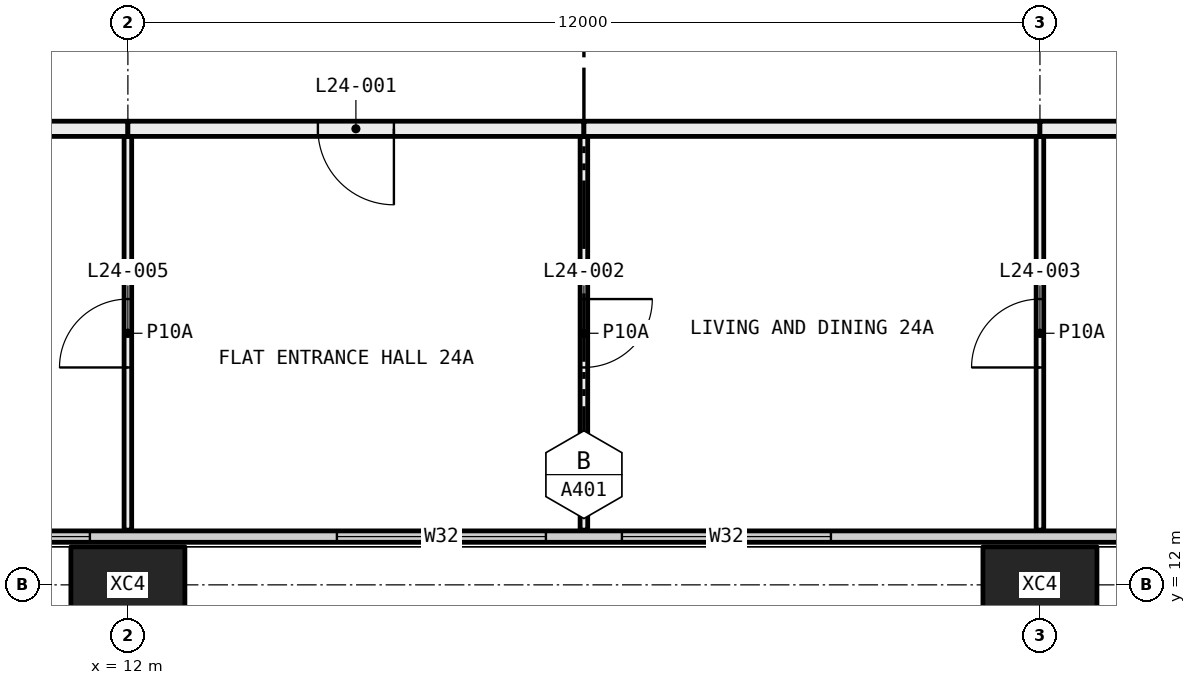
"""IFC4 building model, lengths in metres.
Left out: names, types, materials, properties, quantities, classifications, styles, units other than length and angle.
Written with IfcOpenShell. Run it as: python <this file> out.ifc"""

import sys

from ifc_helpers import new_model, si_unit, direction, frame, frame_2d, origin, origin_2d, place, context, subcontext, project, spatial, rectangle, hollow_rectangle, extrude, element, fill, save


model = new_model("IFC4")
c1 = context("Model", 3, precision=1e-05, world=origin(), true_north=direction((0.0, 1.0)))
c2 = subcontext(c1, "Body", "Model", "MODEL_VIEW")
j1 = project(units=[si_unit("LENGTHUNIT", "METRE"), si_unit("PLANEANGLEUNIT", "RADIAN")], contexts=[c1])
p1 = place(None, origin())
s1 = spatial("IfcSite", under=j1, at=p1, CompositionType="ELEMENT")
p2 = place(p1, origin())
s2 = spatial("IfcBuilding", under=s1, at=p2, CompositionType="ELEMENT")
p3 = place(p2, frame((0.0, 0.0, 96.6)))
s3 = spatial("IfcBuildingStorey", under=s2, at=p3, CompositionType="ELEMENT", Elevation=96.6)
for number, where, z_axis, x_axis in (
    (1, (12.0, 12.0, -0.4), (0.0, 0.0, 1.0), (1.0, 0.0, 0.0)),
    (2, (24.0, 12.0, -0.4), (0.0, 0.0, 1.0), (1.0, 0.0, 0.0)),
):
    element("IfcColumn", number, at=place(p3, frame(where, z_axis=z_axis, x_axis=x_axis)), inside=s3, PredefinedType="COLUMN", context=c2, shape_type="SweptSolid", body=[
        extrude(hollow_rectangle(XDim=1.5, YDim=1.0, WallThickness=0.06, at=origin_2d()), origin(), (0.0, 0.0, 1.0), 3.45),
    ])
p4 = place(p3, frame((6.56, 12.635, 0.0), z_axis=(0.0, 0.0, 1.0), x_axis=(1.0, 0.0, 0.0)))
e3 = element("IfcWall", 3, at=p4, inside=s3, PredefinedType="ELEMENTEDWALL", context=c2, shape_type="SweptSolid", body=[
    extrude(rectangle(XDim=58.88, YDim=0.15, at=frame_2d((29.44, 0.0))), origin(), (0.0, 0.0, 1.0), 3.05),
])
p5 = place(p4, frame((0.44, 0.0, 0.45)))
e4 = element("IfcOpeningElement", 4, at=p5, cuts=e3, PredefinedType="OPENING", context=c2, shape_type="SweptSolid", body=[
    extrude(rectangle(XDim=4.5, YDim=2.55, at=frame_2d((2.25, 1.275))), frame((0.0, 0.085, 0.0), z_axis=(0.0, -1.0, 0.0), x_axis=(1.0, 0.0, 0.0)), (0.0, 0.0, 1.0), 0.17),
])
p6 = place(p4, frame((8.19, 0.0, 0.45)))
e5 = element("IfcOpeningElement", 5, at=p6, cuts=e3, PredefinedType="OPENING", context=c2, shape_type="SweptSolid", body=[
    extrude(rectangle(XDim=2.75, YDim=2.55, at=frame_2d((1.375, 1.275))), frame((0.0, 0.085, 0.0), z_axis=(0.0, -1.0, 0.0), x_axis=(1.0, 0.0, 0.0)), (0.0, 0.0, 1.0), 0.17),
])
p7 = place(p4, frame((11.94, 0.0, 0.45)))
e6 = element("IfcOpeningElement", 6, at=p7, cuts=e3, PredefinedType="OPENING", context=c2, shape_type="SweptSolid", body=[
    extrude(rectangle(XDim=2.75, YDim=2.55, at=frame_2d((1.375, 1.275))), frame((0.0, 0.085, 0.0), z_axis=(0.0, -1.0, 0.0), x_axis=(1.0, 0.0, 0.0)), (0.0, 0.0, 1.0), 0.17),
])
p8 = place(p4, frame((20.19, 0.0, 0.45)))
e7 = element("IfcOpeningElement", 7, at=p8, cuts=e3, PredefinedType="OPENING", context=c2, shape_type="SweptSolid", body=[
    extrude(rectangle(XDim=2.75, YDim=2.55, at=frame_2d((1.375, 1.275))), frame((0.0, 0.085, 0.0), z_axis=(0.0, -1.0, 0.0), x_axis=(1.0, 0.0, 0.0)), (0.0, 0.0, 1.0), 0.17),
])
p9 = place(p4, frame((23.94, 0.0, 0.45)))
e8 = element("IfcOpeningElement", 8, at=p9, cuts=e3, PredefinedType="OPENING", context=c2, shape_type="SweptSolid", body=[
    extrude(rectangle(XDim=2.0, YDim=2.55, at=frame_2d((1.0, 1.275))), frame((0.0, 0.085, 0.0), z_axis=(0.0, -1.0, 0.0), x_axis=(1.0, 0.0, 0.0)), (0.0, 0.0, 1.0), 0.17),
])
p10 = place(p4, frame((32.19, 0.0, 0.45)))
e9 = element("IfcOpeningElement", 9, at=p10, cuts=e3, PredefinedType="OPENING", context=c2, shape_type="SweptSolid", body=[
    extrude(rectangle(XDim=2.75, YDim=2.55, at=frame_2d((1.375, 1.275))), frame((0.0, 0.085, 0.0), z_axis=(0.0, -1.0, 0.0), x_axis=(1.0, 0.0, 0.0)), (0.0, 0.0, 1.0), 0.17),
])
p11 = place(p4, frame((35.94, 0.0, 0.45)))
e10 = element("IfcOpeningElement", 10, at=p11, cuts=e3, PredefinedType="OPENING", context=c2, shape_type="SweptSolid", body=[
    extrude(rectangle(XDim=2.75, YDim=2.55, at=frame_2d((1.375, 1.275))), frame((0.0, 0.085, 0.0), z_axis=(0.0, -1.0, 0.0), x_axis=(1.0, 0.0, 0.0)), (0.0, 0.0, 1.0), 0.17),
])
p12 = place(p4, frame((44.19, 0.0, 0.45)))
e11 = element("IfcOpeningElement", 11, at=p12, cuts=e3, PredefinedType="OPENING", context=c2, shape_type="SweptSolid", body=[
    extrude(rectangle(XDim=2.75, YDim=2.55, at=frame_2d((1.375, 1.275))), frame((0.0, 0.085, 0.0), z_axis=(0.0, -1.0, 0.0), x_axis=(1.0, 0.0, 0.0)), (0.0, 0.0, 1.0), 0.17),
])
p13 = place(p4, frame((47.94, 0.0, 0.45)))
e12 = element("IfcOpeningElement", 12, at=p13, cuts=e3, PredefinedType="OPENING", context=c2, shape_type="SweptSolid", body=[
    extrude(rectangle(XDim=2.0, YDim=2.55, at=frame_2d((1.0, 1.275))), frame((0.0, 0.085, 0.0), z_axis=(0.0, -1.0, 0.0), x_axis=(1.0, 0.0, 0.0)), (0.0, 0.0, 1.0), 0.17),
])
p14 = place(p4, frame((53.94, 0.0, 0.45)))
e13 = element("IfcOpeningElement", 13, at=p14, cuts=e3, PredefinedType="OPENING", context=c2, shape_type="SweptSolid", body=[
    extrude(rectangle(XDim=4.5, YDim=2.55, at=frame_2d((2.25, 1.275))), frame((0.0, 0.085, 0.0), z_axis=(0.0, -1.0, 0.0), x_axis=(1.0, 0.0, 0.0)), (0.0, 0.0, 1.0), 0.17),
])
p15 = place(p3, frame((12.0, 12.72, 0.0), z_axis=(0.0, 0.0, 1.0), x_axis=(0.0, 1.0, 0.0)))
e14 = element("IfcWall", 14, at=p15, inside=s3, PredefinedType="PARTITIONING", context=c2, shape_type="SweptSolid", body=[
    extrude(rectangle(XDim=5.18, YDim=0.1, at=frame_2d((2.59, 0.0))), origin(), (0.0, 0.0, 1.0), 3.05),
])
p16 = place(p15, frame((2.14, 0.0, 0.0)))
e15 = element("IfcOpeningElement", 15, at=p16, cuts=e14, PredefinedType="OPENING", context=c2, shape_type="SweptSolid", body=[
    extrude(rectangle(XDim=0.9, YDim=2.1, at=frame_2d((0.45, 1.05))), frame((0.0, 0.06, 0.0), z_axis=(0.0, -1.0, 0.0), x_axis=(1.0, 0.0, 0.0)), (0.0, 0.0, 1.0), 0.12),
])
p17 = place(p3, frame((12.0, 18.0, 0.0), z_axis=(0.0, 0.0, 1.0), x_axis=(-1.0, 0.0, 0.0)))
e16 = element("IfcWall", 16, at=p17, inside=s3, PredefinedType="PARTITIONING", context=c2, shape_type="SweptSolid", body=[
    extrude(rectangle(XDim=1.9, YDim=0.2, at=frame_2d((0.95, 0.0))), origin(), (0.0, 0.0, 1.0), 3.05),
])
p18 = place(p3, frame((18.0, 12.72, 0.0), z_axis=(0.0, 0.0, 1.0), x_axis=(0.0, 1.0, 0.0)))
e17 = element("IfcWall", 17, at=p18, inside=s3, PredefinedType="PARTITIONING", context=c2, shape_type="SweptSolid", body=[
    extrude(rectangle(XDim=5.18, YDim=0.1, at=frame_2d((2.59, 0.0))), origin(), (0.0, 0.0, 1.0), 3.05),
])
p19 = place(p18, frame((2.14, 0.0, 0.0)))
e18 = element("IfcOpeningElement", 18, at=p19, cuts=e17, PredefinedType="OPENING", context=c2, shape_type="SweptSolid", body=[
    extrude(rectangle(XDim=0.9, YDim=2.1, at=frame_2d((0.45, 1.05))), frame((0.0, 0.06, 0.0), z_axis=(0.0, -1.0, 0.0), x_axis=(1.0, 0.0, 0.0)), (0.0, 0.0, 1.0), 0.12),
])
p20 = place(p3, frame((18.0, 18.0, 0.0), z_axis=(0.0, 0.0, 1.0), x_axis=(-1.0, 0.0, 0.0)))
e19 = element("IfcWall", 19, at=p20, inside=s3, PredefinedType="PARTITIONING", context=c2, shape_type="SweptSolid", body=[
    extrude(rectangle(XDim=6.0, YDim=0.2, at=frame_2d((3.0, 0.0))), origin(), (0.0, 0.0, 1.0), 3.05),
])
p21 = place(p20, frame((2.5, 0.0, 0.0)))
e20 = element("IfcOpeningElement", 20, at=p21, cuts=e19, PredefinedType="OPENING", context=c2, shape_type="SweptSolid", body=[
    extrude(rectangle(XDim=1.0, YDim=2.1, at=frame_2d((0.5, 1.05))), frame((0.0, 0.11, 0.0), z_axis=(0.0, -1.0, 0.0), x_axis=(1.0, 0.0, 0.0)), (0.0, 0.0, 1.0), 0.22),
])
p22 = place(p3, frame((24.0, 12.72, 0.0), z_axis=(0.0, 0.0, 1.0), x_axis=(0.0, 1.0, 0.0)))
e21 = element("IfcWall", 21, at=p22, inside=s3, PredefinedType="PARTITIONING", context=c2, shape_type="SweptSolid", body=[
    extrude(rectangle(XDim=5.18, YDim=0.1, at=frame_2d((2.59, 0.0))), origin(), (0.0, 0.0, 1.0), 3.05),
])
p23 = place(p22, frame((2.14, 0.0, 0.0)))
e22 = element("IfcOpeningElement", 22, at=p23, cuts=e21, PredefinedType="OPENING", context=c2, shape_type="SweptSolid", body=[
    extrude(rectangle(XDim=0.9, YDim=2.1, at=frame_2d((0.45, 1.05))), frame((0.0, 0.06, 0.0), z_axis=(0.0, -1.0, 0.0), x_axis=(1.0, 0.0, 0.0)), (0.0, 0.0, 1.0), 0.12),
])
p24 = place(p3, frame((24.0, 18.0, 0.0), z_axis=(0.0, 0.0, 1.0), x_axis=(-1.0, 0.0, 0.0)))
e23 = element("IfcWall", 23, at=p24, inside=s3, PredefinedType="PARTITIONING", context=c2, shape_type="SweptSolid", body=[
    extrude(rectangle(XDim=6.0, YDim=0.2, at=frame_2d((3.0, 0.0))), origin(), (0.0, 0.0, 1.0), 3.05),
])
p25 = place(p3, frame((25.9, 18.0, 0.0), z_axis=(0.0, 0.0, 1.0), x_axis=(-1.0, 0.0, 0.0)))
e24 = element("IfcWall", 24, at=p25, inside=s3, PredefinedType="PARTITIONING", context=c2, shape_type="SweptSolid", body=[
    extrude(rectangle(XDim=1.9, YDim=0.2, at=frame_2d((0.95, 0.0))), origin(), (0.0, 0.0, 1.0), 3.05),
])
p26 = place(p5, origin())
e25 = element("IfcWindow", 25, at=p26, inside=s3, PartitioningType="SINGLE_PANEL", PredefinedType="WINDOW", context=c2, shape_type="SweptSolid", body=[
    extrude(rectangle(XDim=4.5, YDim=2.55, at=frame_2d((2.25, 1.275))), frame((0.0, 0.03, 0.0), z_axis=(0.0, -1.0, 0.0), x_axis=(1.0, 0.0, 0.0)), (0.0, 0.0, 1.0), 0.06),
])
fill(e4, e25)
p27 = place(p6, origin())
e26 = element("IfcWindow", 26, at=p27, inside=s3, PartitioningType="SINGLE_PANEL", PredefinedType="WINDOW", context=c2, shape_type="SweptSolid", body=[
    extrude(rectangle(XDim=2.75, YDim=2.55, at=frame_2d((1.375, 1.275))), frame((0.0, 0.03, 0.0), z_axis=(0.0, -1.0, 0.0), x_axis=(1.0, 0.0, 0.0)), (0.0, 0.0, 1.0), 0.06),
])
fill(e5, e26)
p28 = place(p7, origin())
e27 = element("IfcWindow", 27, at=p28, inside=s3, PartitioningType="SINGLE_PANEL", PredefinedType="WINDOW", context=c2, shape_type="SweptSolid", body=[
    extrude(rectangle(XDim=2.75, YDim=2.55, at=frame_2d((1.375, 1.275))), frame((0.0, 0.03, 0.0), z_axis=(0.0, -1.0, 0.0), x_axis=(1.0, 0.0, 0.0)), (0.0, 0.0, 1.0), 0.06),
])
fill(e6, e27)
p29 = place(p21, origin())
e28 = element("IfcDoor", 28, at=p29, inside=s3, OperationType="SINGLE_SWING_RIGHT", PredefinedType="DOOR", context=c2, shape_type="SweptSolid", body=[
    extrude(rectangle(XDim=1.0, YDim=2.1, at=frame_2d((0.5, 1.05))), frame((0.0, 0.025, 0.0), z_axis=(0.0, -1.0, 0.0), x_axis=(1.0, 0.0, 0.0)), (0.0, 0.0, 1.0), 0.05),
])
fill(e20, e28)
p30 = place(p19, frame((0.9, 0.0, 0.0), x_axis=(-1.0, 0.0, 0.0)))
e29 = element("IfcDoor", 29, at=p30, inside=s3, OperationType="SINGLE_SWING_RIGHT", PredefinedType="DOOR", context=c2, shape_type="SweptSolid", body=[
    extrude(rectangle(XDim=0.9, YDim=2.1, at=frame_2d((0.45, 1.05))), frame((0.0, 0.025, 0.0), z_axis=(0.0, -1.0, 0.0), x_axis=(1.0, 0.0, 0.0)), (0.0, 0.0, 1.0), 0.05),
])
fill(e18, e29)
p31 = place(p23, origin())
e30 = element("IfcDoor", 30, at=p31, inside=s3, OperationType="SINGLE_SWING_RIGHT", PredefinedType="DOOR", context=c2, shape_type="SweptSolid", body=[
    extrude(rectangle(XDim=0.9, YDim=2.1, at=frame_2d((0.45, 1.05))), frame((0.0, 0.025, 0.0), z_axis=(0.0, -1.0, 0.0), x_axis=(1.0, 0.0, 0.0)), (0.0, 0.0, 1.0), 0.05),
])
fill(e22, e30)
p32 = place(p16, origin())
e31 = element("IfcDoor", 31, at=p32, inside=s3, OperationType="SINGLE_SWING_RIGHT", PredefinedType="DOOR", context=c2, shape_type="SweptSolid", body=[
    extrude(rectangle(XDim=0.9, YDim=2.1, at=frame_2d((0.45, 1.05))), frame((0.0, 0.025, 0.0), z_axis=(0.0, -1.0, 0.0), x_axis=(1.0, 0.0, 0.0)), (0.0, 0.0, 1.0), 0.05),
])
fill(e15, e31)
save(model, sys.argv[1])
